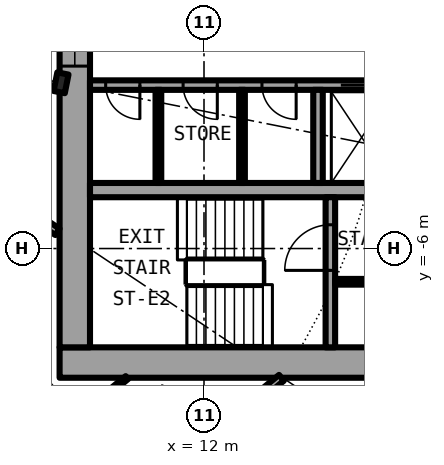
"""IFC4 building model, lengths in metres.
Left out: names, types, materials, properties, quantities, classifications, styles, units other than length and angle.
Written with IfcOpenShell. Run it as: python <this file> out.ifc"""

import sys

from ifc_helpers import new_model, si_unit, direction, frame, frame_2d, origin, origin_2d, place, context, subcontext, project, spatial, rectangle, i_section, extrude, element, fill, save


model = new_model("IFC4")
c1 = context("Model", 3, precision=1e-05, world=origin(), true_north=direction((0.0, 1.0)))
c2 = subcontext(c1, "Body", "Model", "MODEL_VIEW")
j1 = project(units=[si_unit("LENGTHUNIT", "METRE"), si_unit("PLANEANGLEUNIT", "RADIAN")], contexts=[c1])
p1 = place(None, origin())
s1 = spatial("IfcSite", under=j1, at=p1, CompositionType="ELEMENT")
p2 = place(p1, origin())
s2 = spatial("IfcBuilding", under=s1, at=p2, CompositionType="ELEMENT")
p3 = place(p2, frame((0.0, 0.0, 35.0)))
s3 = spatial("IfcBuildingStorey", under=s2, at=p3, CompositionType="ELEMENT", Elevation=35.0)
p4 = place(p3, frame((8.239, -1.639, 0.0), z_axis=(0.0, 0.0, 1.0), x_axis=(0.980785280403, -0.195090322016, 0.0)))
e1 = element("IfcColumn", 1, at=p4, inside=s3, PredefinedType="COLUMN", context=c2, shape_type="SweptSolid", body=[
    extrude(i_section(OverallWidth=0.3, OverallDepth=0.5, WebThickness=0.014, FlangeThickness=0.028, FilletRadius=0.027, at=origin_2d()), origin(), (0.0, 0.0, 1.0), 3.05),
])
p5 = place(p3, frame((8.2, -9.0, 0.0), z_axis=(0.0, 0.0, 1.0), x_axis=(1.0, 0.0, 0.0)))
e2 = element("IfcWall", 2, at=p5, inside=s3, PredefinedType="SHEAR", context=c2, shape_type="SweptSolid", body=[
    extrude(rectangle(XDim=14.2, YDim=0.8, at=frame_2d((7.1, 0.0))), origin(), (0.0, 0.0, 1.0), 3.05),
])
p6 = place(p5, frame((11.675, 0.0, 0.0)))
e3 = element("IfcOpeningElement", 3, at=p6, cuts=e2, PredefinedType="OPENING", context=c2, shape_type="SweptSolid", body=[
    extrude(rectangle(XDim=1.2, YDim=2.3, at=frame_2d((0.6, 1.15))), frame((0.0, 0.41, 0.0), z_axis=(0.0, -1.0, 0.0), x_axis=(1.0, 0.0, 0.0)), (0.0, 0.0, 1.0), 0.82),
])
p7 = place(p3, frame((8.6, -8.6, 0.0), z_axis=(0.0, 0.0, 1.0), x_axis=(0.0, 1.0, 0.0)))
e4 = element("IfcWall", 4, at=p7, inside=s3, PredefinedType="SHEAR", context=c2, shape_type="SweptSolid", body=[
    extrude(rectangle(XDim=17.2, YDim=0.8, at=frame_2d((8.6, 0.0))), origin(), (0.0, 0.0, 1.0), 3.05),
])
p8 = place(p7, frame((7.4, 0.0, 0.1)))
e5 = element("IfcOpeningElement", 5, at=p8, cuts=e4, PredefinedType="OPENING", context=c2, shape_type="SweptSolid", body=[
    extrude(rectangle(XDim=2.4, YDim=2.2, at=frame_2d((1.2, 1.1))), frame((0.0, 0.41, 0.0), z_axis=(0.0, -1.0, 0.0), x_axis=(1.0, 0.0, 0.0)), (0.0, 0.0, 1.0), 0.82),
])
p9 = place(p3, frame((19.15, -1.7, 0.0), z_axis=(0.0, 0.0, 1.0), x_axis=(-1.0, 0.0, 0.0)))
e6 = element("IfcWall", 6, at=p9, inside=s3, PredefinedType="SHEAR", context=c2, shape_type="SweptSolid", body=[
    extrude(rectangle(XDim=10.15, YDim=0.25, at=frame_2d((5.075, 0.0))), origin(), (0.0, 0.0, 1.0), 3.05),
])
p10 = place(p9, frame((2.45, 0.0, 0.0)))
e7 = element("IfcOpeningElement", 7, at=p10, cuts=e6, PredefinedType="OPENING", context=c2, shape_type="SweptSolid", body=[
    extrude(rectangle(XDim=1.1, YDim=2.3, at=frame_2d((0.55, 1.15))), frame((0.0, 0.135, 0.0), z_axis=(0.0, -1.0, 0.0), x_axis=(1.0, 0.0, 0.0)), (0.0, 0.0, 1.0), 0.27),
])
p11 = place(p9, frame((8.837, 0.0, 0.0)))
e8 = element("IfcOpeningElement", 8, at=p11, cuts=e6, PredefinedType="OPENING", context=c2, shape_type="SweptSolid", body=[
    extrude(rectangle(XDim=0.9, YDim=2.3, at=frame_2d((0.45, 1.15))), frame((0.0, 0.135, 0.0), z_axis=(0.0, -1.0, 0.0), x_axis=(1.0, 0.0, 0.0)), (0.0, 0.0, 1.0), 0.27),
])
p12 = place(p9, frame((6.8, 0.0, 0.0)))
e9 = element("IfcOpeningElement", 9, at=p12, cuts=e6, PredefinedType="OPENING", context=c2, shape_type="SweptSolid", body=[
    extrude(rectangle(XDim=0.9, YDim=2.3, at=frame_2d((0.45, 1.15))), frame((0.0, 0.135, 0.0), z_axis=(0.0, -1.0, 0.0), x_axis=(1.0, 0.0, 0.0)), (0.0, 0.0, 1.0), 0.27),
])
p13 = place(p9, frame((4.725, 0.0, 0.0)))
e10 = element("IfcOpeningElement", 10, at=p13, cuts=e6, PredefinedType="OPENING", context=c2, shape_type="SweptSolid", body=[
    extrude(rectangle(XDim=0.9, YDim=2.3, at=frame_2d((0.45, 1.15))), frame((0.0, 0.135, 0.0), z_axis=(0.0, -1.0, 0.0), x_axis=(1.0, 0.0, 0.0)), (0.0, 0.0, 1.0), 0.27),
])
p14 = place(p9, frame((0.413, 0.0, 0.0)))
e11 = element("IfcOpeningElement", 11, at=p14, cuts=e6, PredefinedType="OPENING", context=c2, shape_type="SweptSolid", body=[
    extrude(rectangle(XDim=0.9, YDim=2.3, at=frame_2d((0.45, 1.15))), frame((0.0, 0.135, 0.0), z_axis=(0.0, -1.0, 0.0), x_axis=(1.0, 0.0, 0.0)), (0.0, 0.0, 1.0), 0.27),
])
p15 = place(p3, frame((9.0, -4.462, 0.0), z_axis=(0.0, 0.0, 1.0), x_axis=(1.0, 0.0, 0.0)))
e12 = element("IfcWall", 12, at=p15, inside=s3, PredefinedType="SHEAR", context=c2, shape_type="SweptSolid", body=[
    extrude(rectangle(XDim=10.15, YDim=0.375, at=frame_2d((5.075, 0.0))), origin(), (0.0, 0.0, 1.0), 3.05),
])
p16 = place(p3, frame((15.325, -8.6, 0.0), z_axis=(0.0, 0.0, 1.0), x_axis=(0.0, 1.0, 0.0)))
e13 = element("IfcWall", 13, at=p16, inside=s3, PredefinedType="SHEAR", context=c2, shape_type="SweptSolid", body=[
    extrude(rectangle(XDim=3.95, YDim=0.25, at=frame_2d((1.975, 0.0))), origin(), (0.0, 0.0, 1.0), 3.05),
])
p17 = place(p16, frame((2.025, 0.0, 0.0)))
e14 = element("IfcOpeningElement", 14, at=p17, cuts=e13, PredefinedType="OPENING", context=c2, shape_type="SweptSolid", body=[
    extrude(rectangle(XDim=1.2, YDim=2.3, at=frame_2d((0.6, 1.15))), frame((0.0, 0.135, 0.0), z_axis=(0.0, -1.0, 0.0), x_axis=(1.0, 0.0, 0.0)), (0.0, 0.0, 1.0), 0.27),
])
p18 = place(p3, frame((15.0, -1.825, 0.0), z_axis=(0.0, 0.0, 1.0), x_axis=(0.0, -1.0, 0.0)))
e15 = element("IfcWall", 15, at=p18, inside=s3, PredefinedType="SOLIDWALL", context=c2, shape_type="SweptSolid", body=[
    extrude(rectangle(XDim=2.45, YDim=0.25, at=frame_2d((1.225, 0.0))), origin(), (0.0, 0.0, 1.0), 2.7),
])
for number, where, z_axis, x_axis in (
    (16, (10.8, -1.825, 0.0), (0.0, 0.0, 1.0), (0.0, -1.0, 0.0)),
    (17, (13.0, -1.825, 0.0), (0.0, 0.0, 1.0), (0.0, -1.0, 0.0)),
):
    element("IfcWall", number, at=place(p3, frame(where, z_axis=z_axis, x_axis=x_axis)), inside=s3, PredefinedType="PARTITIONING", context=c2, shape_type="SweptSolid", body=[
        extrude(rectangle(XDim=2.45, YDim=0.15, at=frame_2d((1.225, 0.0))), origin(), (0.0, 0.0, 1.0), 2.7),
    ])
p19 = place(p3, frame((15.45, -6.875, 0.0), z_axis=(0.0, 0.0, 1.0), x_axis=(1.0, 0.0, 0.0)))
e18 = element("IfcWall", 18, at=p19, inside=s3, PredefinedType="PARTITIONING", context=c2, shape_type="SweptSolid", body=[
    extrude(rectangle(XDim=3.7, YDim=0.15, at=frame_2d((1.85, 0.0))), origin(), (0.0, 0.0, 1.0), 2.7),
])
p20 = place(p19, frame((1.4, 0.0, 0.0)))
e19 = element("IfcOpeningElement", 19, at=p20, cuts=e18, PredefinedType="OPENING", context=c2, shape_type="SweptSolid", body=[
    extrude(rectangle(XDim=0.9, YDim=2.3, at=frame_2d((0.45, 1.15))), frame((0.0, 0.085, 0.0), z_axis=(0.0, -1.0, 0.0), x_axis=(1.0, 0.0, 0.0)), (0.0, 0.0, 1.0), 0.17),
])
p21 = place(p3, frame((6.467, -15.614, 0.0), z_axis=(0.0, 0.0, 1.0), x_axis=(0.773084654695, 0.634302858794, 0.0)))
e20 = element("IfcWall", 20, at=p21, inside=s3, PredefinedType="PARTITIONING", context=c2, shape_type="SweptSolid", body=[
    extrude(rectangle(XDim=9.793, YDim=0.2, at=frame_2d((4.896, 0.0))), origin(), (0.0, 0.0, 1.0), 2.7),
])
p22 = place(p21, frame((4.407, 0.0, 0.0)))
e21 = element("IfcOpeningElement", 21, at=p22, cuts=e20, PredefinedType="OPENING", context=c2, shape_type="SweptSolid", body=[
    extrude(rectangle(XDim=1.0, YDim=2.3, at=frame_2d((0.5, 1.15))), frame((0.0, 0.11, 0.0), z_axis=(0.0, -1.0, 0.0), x_axis=(1.0, 0.0, 0.0)), (0.0, 0.0, 1.0), 0.22),
])
p23 = place(p3, frame((8.619, -10.505, 0.0), z_axis=(0.0, 0.0, 1.0), x_axis=(0.77321028337, 0.634149712363, 0.0)))
e22 = element("IfcWall", 22, at=p23, inside=s3, PredefinedType="PARTITIONING", context=c2, shape_type="SweptSolid", body=[
    extrude(rectangle(XDim=1.749, YDim=0.1, at=frame_2d((0.874, 0.0))), origin(), (0.0, 0.0, 1.0), 2.7),
])
p24 = place(p3, frame((6.513, -4.472, 0.0), z_axis=(0.0, 0.0, 1.0), x_axis=(0.831417956244, -0.555647533996, 0.0)))
e23 = element("IfcWall", 23, at=p24, inside=s3, PredefinedType="PARTITIONING", context=c2, shape_type="SweptSolid", body=[
    extrude(rectangle(XDim=1.962, YDim=0.2, at=frame_2d((0.981, 0.0))), origin(), (0.0, 0.0, 1.0), 2.7),
])
p25 = place(p3, frame((4.897, -5.969, 0.0), z_axis=(0.0, 0.0, 1.0), x_axis=(0.634539754242, -0.772890225249, 0.0)))
e24 = element("IfcWall", 24, at=p25, inside=s3, PredefinedType="PARTITIONING", context=c2, shape_type="SweptSolid", body=[
    extrude(rectangle(XDim=5.867, YDim=0.1, at=frame_2d((2.934, 0.0))), origin(), (0.0, 0.0, 1.0), 2.7),
])
p26 = place(p25, frame((2.484, 0.0, 0.0)))
e25 = element("IfcOpeningElement", 25, at=p26, cuts=e24, PredefinedType="OPENING", context=c2, shape_type="SweptSolid", body=[
    extrude(rectangle(XDim=0.9, YDim=2.3, at=frame_2d((0.45, 1.15))), frame((0.0, 0.06, 0.0), z_axis=(0.0, -1.0, 0.0), x_axis=(1.0, 0.0, 0.0)), (0.0, 0.0, 1.0), 0.12),
])
p27 = place(p10, origin())
e26 = element("IfcDoor", 26, at=p27, inside=s3, OperationType="DOUBLE_DOOR_SLIDING", PredefinedType="DOOR", context=c2, shape_type="SweptSolid", body=[
    extrude(rectangle(XDim=1.1, YDim=2.3, at=frame_2d((0.55, 1.15))), frame((0.0, 0.025, 0.0), z_axis=(0.0, -1.0, 0.0), x_axis=(1.0, 0.0, 0.0)), (0.0, 0.0, 1.0), 0.05),
])
fill(e7, e26)
p28 = place(p11, origin())
e27 = element("IfcDoor", 27, at=p28, inside=s3, OperationType="SINGLE_SWING_LEFT", PredefinedType="DOOR", context=c2, shape_type="SweptSolid", body=[
    extrude(rectangle(XDim=0.9, YDim=2.3, at=frame_2d((0.45, 1.15))), frame((0.0, 0.025, 0.0), z_axis=(0.0, -1.0, 0.0), x_axis=(1.0, 0.0, 0.0)), (0.0, 0.0, 1.0), 0.05),
])
fill(e8, e27)
p29 = place(p12, origin())
e28 = element("IfcDoor", 28, at=p29, inside=s3, OperationType="SINGLE_SWING_LEFT", PredefinedType="DOOR", context=c2, shape_type="SweptSolid", body=[
    extrude(rectangle(XDim=0.9, YDim=2.3, at=frame_2d((0.45, 1.15))), frame((0.0, 0.025, 0.0), z_axis=(0.0, -1.0, 0.0), x_axis=(1.0, 0.0, 0.0)), (0.0, 0.0, 1.0), 0.05),
])
fill(e9, e28)
p30 = place(p13, origin())
e29 = element("IfcDoor", 29, at=p30, inside=s3, OperationType="SINGLE_SWING_LEFT", PredefinedType="DOOR", context=c2, shape_type="SweptSolid", body=[
    extrude(rectangle(XDim=0.9, YDim=2.3, at=frame_2d((0.45, 1.15))), frame((0.0, 0.025, 0.0), z_axis=(0.0, -1.0, 0.0), x_axis=(1.0, 0.0, 0.0)), (0.0, 0.0, 1.0), 0.05),
])
fill(e10, e29)
p31 = place(p17, origin())
e30 = element("IfcDoor", 30, at=p31, inside=s3, OperationType="SINGLE_SWING_LEFT", PredefinedType="DOOR", context=c2, shape_type="SweptSolid", body=[
    extrude(rectangle(XDim=1.2, YDim=2.3, at=frame_2d((0.6, 1.15))), frame((0.0, 0.025, 0.0), z_axis=(0.0, -1.0, 0.0), x_axis=(1.0, 0.0, 0.0)), (0.0, 0.0, 1.0), 0.05),
])
fill(e14, e30)
p32 = place(p8, origin())
e31 = element("IfcWindow", 31, at=p32, inside=s3, PartitioningType="SINGLE_PANEL", PredefinedType="WINDOW", context=c2, shape_type="SweptSolid", body=[
    extrude(rectangle(XDim=2.4, YDim=2.2, at=frame_2d((1.2, 1.1))), frame((0.0, 0.03, 0.0), z_axis=(0.0, -1.0, 0.0), x_axis=(1.0, 0.0, 0.0)), (0.0, 0.0, 1.0), 0.06),
])
fill(e5, e31)
save(model, sys.argv[1])
